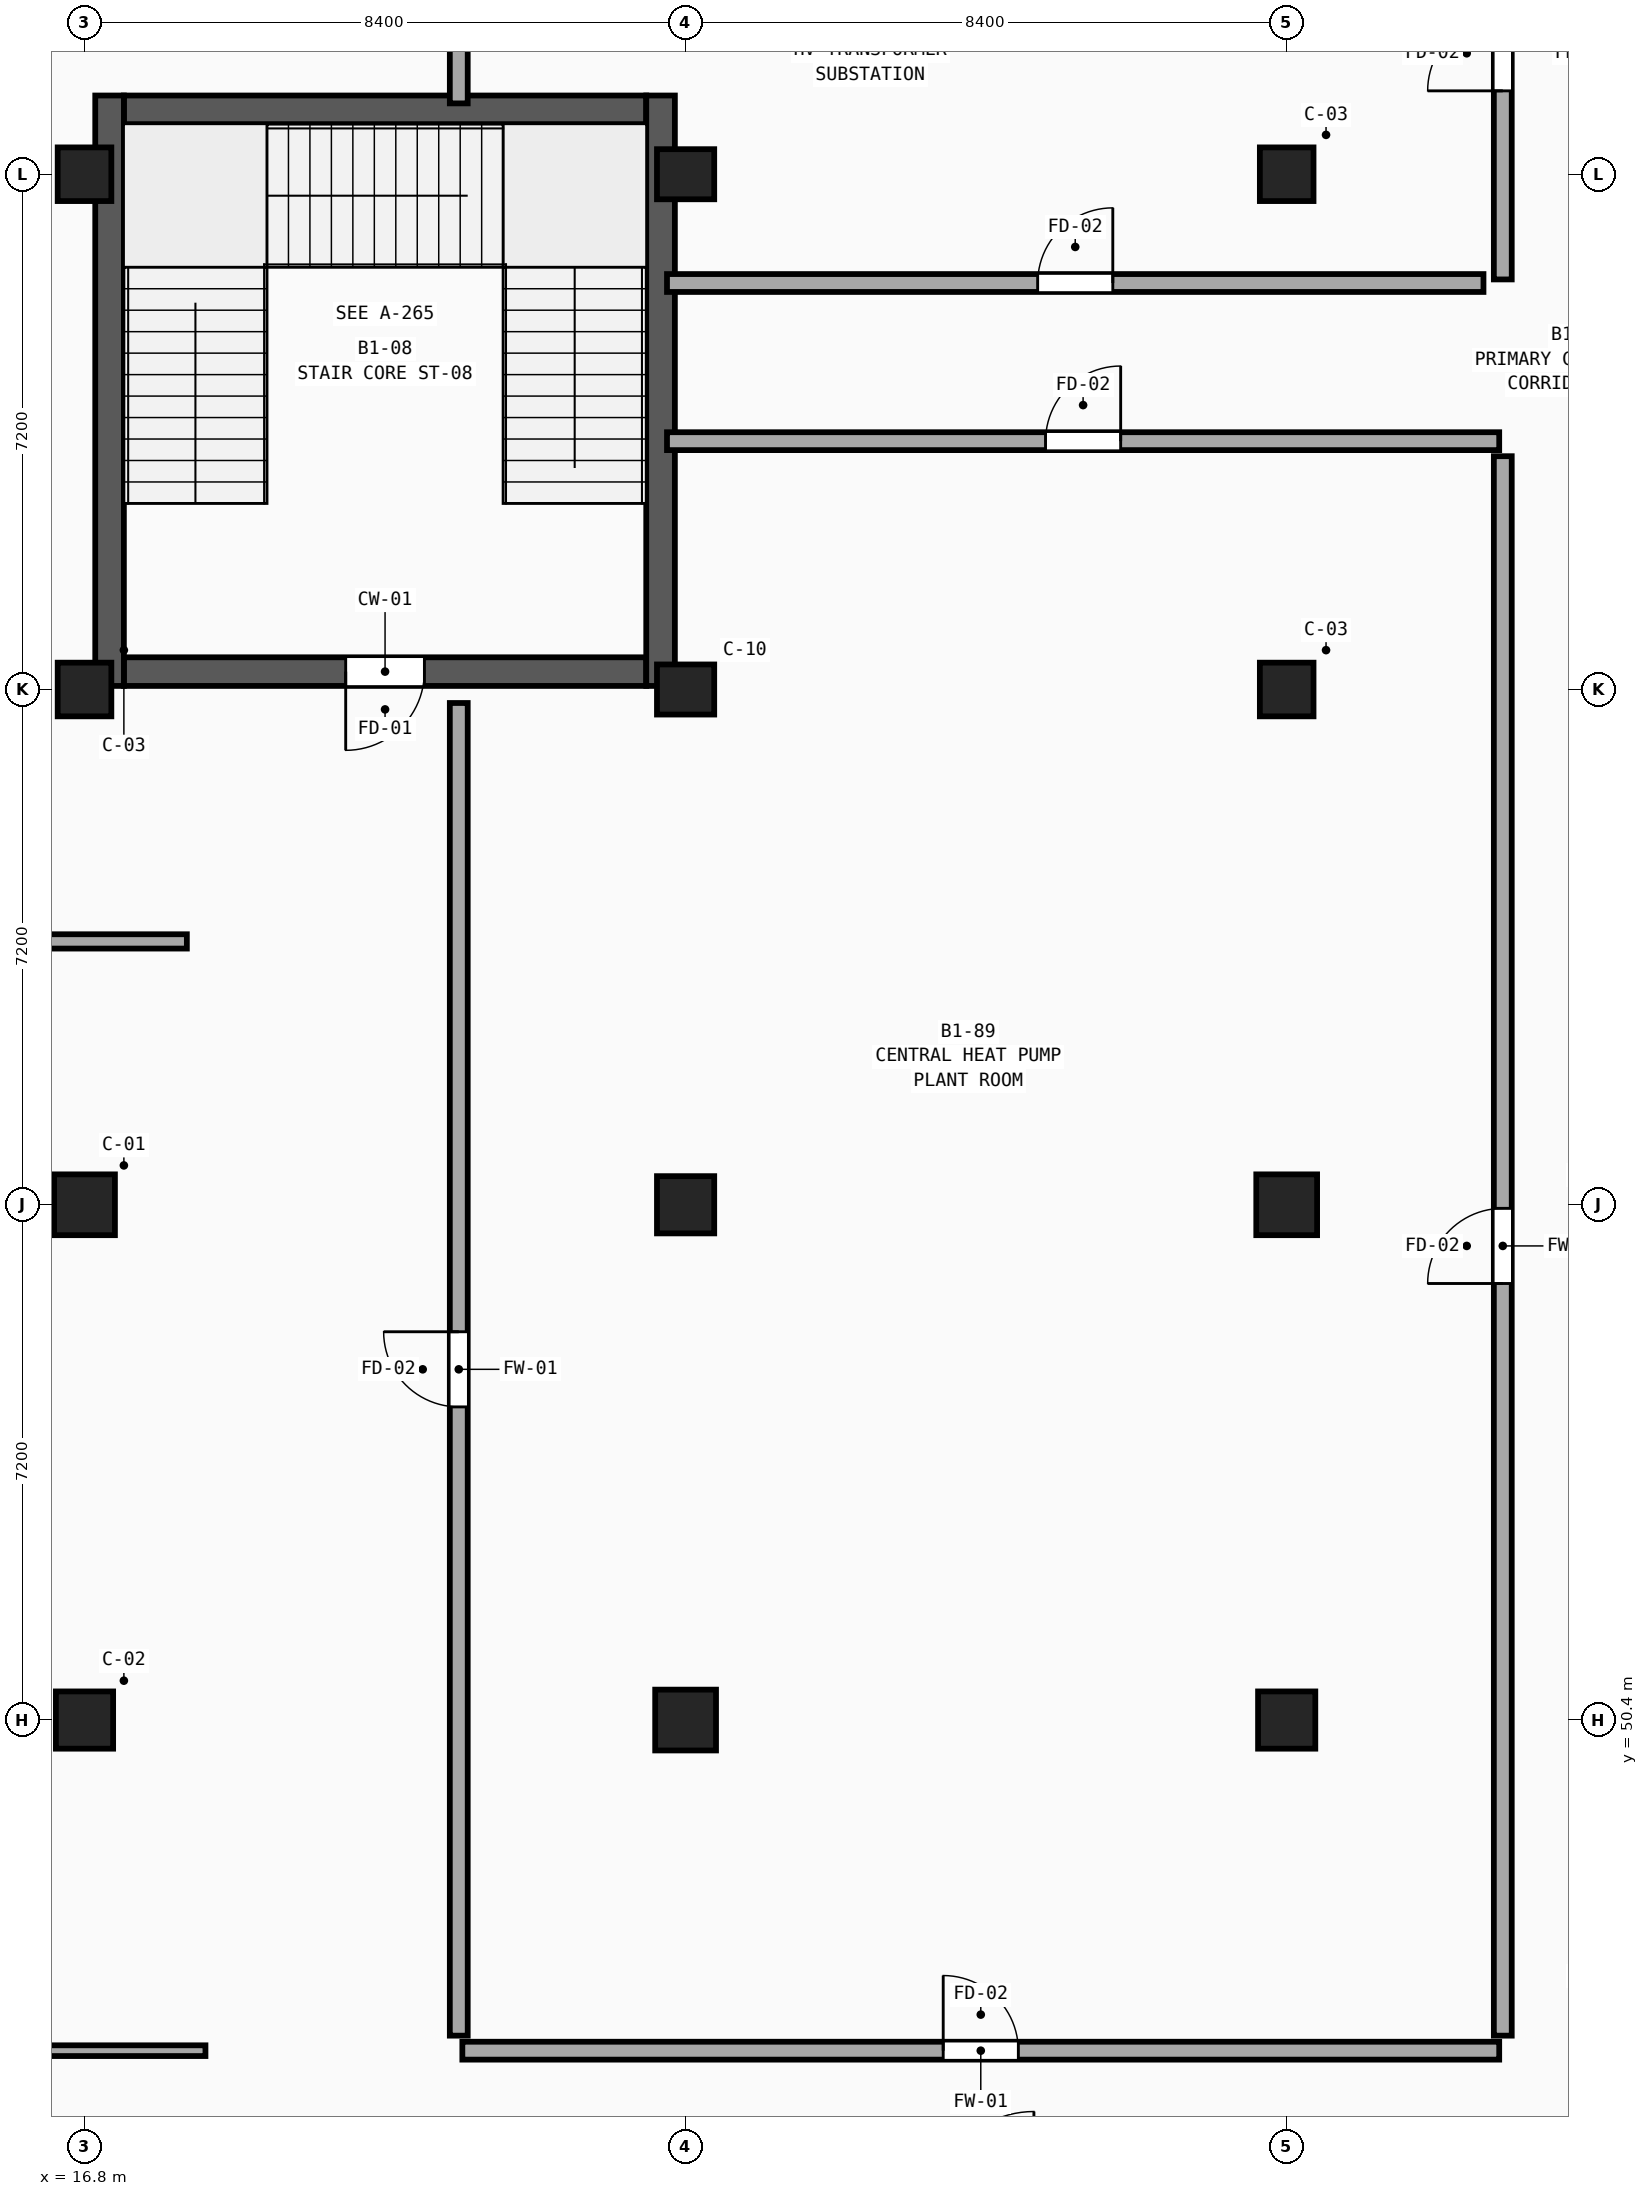
"""IFC4 building model, lengths in metres.
Left out: names, types, materials, properties, quantities, classifications, styles, units other than length and angle.
Written with IfcOpenShell. Run it as: python <this file> out.ifc"""

import sys

from ifc_helpers import new_model, si_unit, direction, frame, frame_2d, origin, origin_2d, place, context, subcontext, project, spatial, rectangle, extrude, element, fill, save


model = new_model("IFC4")
c1 = context("Model", 3, precision=1e-05, world=origin(), true_north=direction((0.0, 1.0)))
c2 = subcontext(c1, "Body", "Model", "MODEL_VIEW")
j1 = project(units=[si_unit("LENGTHUNIT", "METRE"), si_unit("PLANEANGLEUNIT", "RADIAN")], contexts=[c1])
p1 = place(None, origin())
s1 = spatial("IfcSite", under=j1, at=p1, CompositionType="ELEMENT")
p2 = place(p1, origin())
s2 = spatial("IfcBuilding", under=s1, at=p2, CompositionType="ELEMENT")
p3 = place(p2, frame((0.0, 0.0, -5.4)))
s3 = spatial("IfcBuildingStorey", under=s2, at=p3, CompositionType="ELEMENT", Elevation=-5.4)
p4 = place(p3, frame((16.8, 50.4, 0.0), z_axis=(0.0, 0.0, 1.0), x_axis=(1.0, 0.0, 0.0)))
e1 = element("IfcColumn", 1, at=p4, inside=s3, PredefinedType="COLUMN", context=c2, shape_type="SweptSolid", body=[
    extrude(rectangle(XDim=0.8, YDim=0.8, at=origin_2d()), origin(), (0.0, 0.0, 1.0), 5.4),
])
p5 = place(p3, frame((16.8, 57.6, 0.0), z_axis=(0.0, 0.0, 1.0), x_axis=(1.0, 0.0, 0.0)))
e2 = element("IfcColumn", 2, at=p5, inside=s3, PredefinedType="COLUMN", context=c2, shape_type="SweptSolid", body=[
    extrude(rectangle(XDim=0.85, YDim=0.85, at=origin_2d()), origin(), (0.0, 0.0, 1.0), 5.4),
])
for number, where, z_axis, x_axis in (
    (3, (16.8, 64.8, 0.0), (0.0, 0.0, 1.0), (1.0, 0.0, 0.0)),
    (4, (16.8, 72.0, 0.0), (0.0, 0.0, 1.0), (1.0, 0.0, 0.0)),
):
    element("IfcColumn", number, at=place(p3, frame(where, z_axis=z_axis, x_axis=x_axis)), inside=s3, PredefinedType="COLUMN", context=c2, shape_type="SweptSolid", body=[
        extrude(rectangle(XDim=0.75, YDim=0.75, at=origin_2d()), origin(), (0.0, 0.0, 1.0), 5.4),
    ])
p6 = place(p3, frame((25.2, 50.4, 0.0), z_axis=(0.0, 0.0, 1.0), x_axis=(1.0, 0.0, 0.0)))
e5 = element("IfcColumn", 5, at=p6, inside=s3, PredefinedType="COLUMN", context=c2, shape_type="SweptSolid", body=[
    extrude(rectangle(XDim=0.85, YDim=0.85, at=origin_2d()), origin(), (0.0, 0.0, 1.0), 5.4),
])
p7 = place(p3, frame((25.2, 57.6, 0.0), z_axis=(0.0, 0.0, 1.0), x_axis=(1.0, 0.0, 0.0)))
e6 = element("IfcColumn", 6, at=p7, inside=s3, PredefinedType="COLUMN", context=c2, shape_type="SweptSolid", body=[
    extrude(rectangle(XDim=0.8, YDim=0.8, at=origin_2d()), origin(), (0.0, 0.0, 1.0), 5.4),
])
for number, where, z_axis, x_axis in (
    (7, (25.2, 64.8, 0.0), (0.0, 0.0, 1.0), (1.0, 0.0, 0.0)),
    (8, (25.2, 72.0, 0.0), (0.0, 0.0, 1.0), (1.0, 0.0, 0.0)),
):
    element("IfcColumn", number, at=place(p3, frame(where, z_axis=z_axis, x_axis=x_axis)), inside=s3, PredefinedType="COLUMN", context=c2, shape_type="SweptSolid", body=[
        extrude(rectangle(XDim=0.8, YDim=0.7, at=origin_2d()), origin(), (0.0, 0.0, 1.0), 5.4),
    ])
p8 = place(p3, frame((33.6, 50.4, 0.0), z_axis=(0.0, 0.0, 1.0), x_axis=(1.0, 0.0, 0.0)))
e9 = element("IfcColumn", 9, at=p8, inside=s3, PredefinedType="COLUMN", context=c2, shape_type="SweptSolid", body=[
    extrude(rectangle(XDim=0.8, YDim=0.8, at=origin_2d()), origin(), (0.0, 0.0, 1.0), 5.4),
])
p9 = place(p3, frame((33.6, 57.6, 0.0), z_axis=(0.0, 0.0, 1.0), x_axis=(1.0, 0.0, 0.0)))
e10 = element("IfcColumn", 10, at=p9, inside=s3, PredefinedType="COLUMN", context=c2, shape_type="SweptSolid", body=[
    extrude(rectangle(XDim=0.85, YDim=0.85, at=origin_2d()), origin(), (0.0, 0.0, 1.0), 5.4),
])
for number, where, z_axis, x_axis in (
    (11, (33.6, 64.8, 0.0), (0.0, 0.0, 1.0), (1.0, 0.0, 0.0)),
    (12, (33.6, 72.0, 0.0), (0.0, 0.0, 1.0), (1.0, 0.0, 0.0)),
):
    element("IfcColumn", number, at=place(p3, frame(where, z_axis=z_axis, x_axis=x_axis)), inside=s3, PredefinedType="COLUMN", context=c2, shape_type="SweptSolid", body=[
        extrude(rectangle(XDim=0.75, YDim=0.75, at=origin_2d()), origin(), (0.0, 0.0, 1.0), 5.4),
    ])
p10 = place(p3, frame((24.65, 65.05, 0.0), z_axis=(0.0, 0.0, 1.0), x_axis=(-1.0, 0.0, 0.0)))
e13 = element("IfcWall", 13, at=p10, inside=s3, PredefinedType="SHEAR", context=c2, shape_type="SweptSolid", body=[
    extrude(rectangle(XDim=7.3, YDim=0.4, at=frame_2d((3.65, 0.0))), origin(), (0.0, 0.0, 1.0), 5.4),
])
p11 = place(p10, frame((3.1, 0.0, 0.0)))
e14 = element("IfcOpeningElement", 14, at=p11, cuts=e13, PredefinedType="OPENING", context=c2, shape_type="SweptSolid", body=[
    extrude(rectangle(XDim=1.1, YDim=2.2, at=frame_2d((0.55, 1.1))), frame((0.0, 0.22, 0.0), z_axis=(0.0, -1.0, 0.0), x_axis=(1.0, 0.0, 0.0)), (0.0, 0.0, 1.0), 0.44),
])
p12 = place(p3, frame((17.35, 72.9, 0.0), z_axis=(0.0, 0.0, 1.0), x_axis=(1.0, 0.0, 0.0)))
e15 = element("IfcWall", 15, at=p12, inside=s3, PredefinedType="SHEAR", context=c2, shape_type="SweptSolid", body=[
    extrude(rectangle(XDim=7.3, YDim=0.4, at=frame_2d((3.65, 0.0))), origin(), (0.0, 0.0, 1.0), 5.4),
])
for number, where, z_axis, x_axis in (
    (16, (17.15, 73.1, 0.0), (0.0, 0.0, 1.0), (0.0, -1.0, 0.0)),
    (17, (24.85, 64.85, 0.0), (0.0, 0.0, 1.0), (0.0, 1.0, 0.0)),
):
    element("IfcWall", number, at=place(p3, frame(where, z_axis=z_axis, x_axis=x_axis)), inside=s3, PredefinedType="SHEAR", context=c2, shape_type="SweptSolid", body=[
        extrude(rectangle(XDim=8.25, YDim=0.4, at=frame_2d((4.125, 0.0))), origin(), (0.0, 0.0, 1.0), 5.4),
    ])
p13 = place(p3, frame((36.62, 45.99, 0.0), z_axis=(0.0, 0.0, 1.0), x_axis=(0.0, 1.0, 0.0)))
e18 = element("IfcWall", 18, at=p13, inside=s3, PredefinedType="SOLIDWALL", context=c2, shape_type="SweptSolid", body=[
    extrude(rectangle(XDim=22.07, YDim=0.25, at=frame_2d((11.035, 0.0))), origin(), (0.0, 0.0, 1.0), 5.05),
])
p14 = place(p13, frame((10.51, 0.0, 0.0)))
e19 = element("IfcOpeningElement", 19, at=p14, cuts=e18, PredefinedType="OPENING", context=c2, shape_type="SweptSolid", body=[
    extrude(rectangle(XDim=1.05, YDim=2.15, at=frame_2d((0.525, 1.075))), frame((0.0, 0.145, 0.0), z_axis=(0.0, -1.0, 0.0), x_axis=(1.0, 0.0, 0.0)), (0.0, 0.0, 1.0), 0.29),
])
p15 = place(p3, frame((22.03, 45.99, 0.0), z_axis=(0.0, 0.0, 1.0), x_axis=(0.0, 1.0, 0.0)))
e20 = element("IfcWall", 20, at=p15, inside=s3, PredefinedType="SOLIDWALL", context=c2, shape_type="SweptSolid", body=[
    extrude(rectangle(XDim=18.621, YDim=0.25, at=frame_2d((9.311, 0.0))), origin(), (0.0, 0.0, 1.0), 5.05),
])
p16 = place(p15, frame((8.786, 0.0, 0.0)))
e21 = element("IfcOpeningElement", 21, at=p16, cuts=e20, PredefinedType="OPENING", context=c2, shape_type="SweptSolid", body=[
    extrude(rectangle(XDim=1.05, YDim=2.15, at=frame_2d((0.525, 1.075))), frame((0.0, 0.145, 0.0), z_axis=(0.0, -1.0, 0.0), x_axis=(1.0, 0.0, 0.0)), (0.0, 0.0, 1.0), 0.29),
])
p17 = place(p3, frame((22.08, 45.78, 0.0), z_axis=(0.0, 0.0, 1.0), x_axis=(1.0, 0.0, 0.0)))
e22 = element("IfcWall", 22, at=p17, inside=s3, PredefinedType="SOLIDWALL", context=c2, shape_type="SweptSolid", body=[
    extrude(rectangle(XDim=14.49, YDim=0.25, at=frame_2d((7.245, 0.0))), origin(), (0.0, 0.0, 1.0), 5.05),
])
p18 = place(p17, frame((6.72, 0.0, 0.0)))
e23 = element("IfcOpeningElement", 23, at=p18, cuts=e22, PredefinedType="OPENING", context=c2, shape_type="SweptSolid", body=[
    extrude(rectangle(XDim=1.05, YDim=2.15, at=frame_2d((0.525, 1.075))), frame((0.0, 0.145, 0.0), z_axis=(0.0, -1.0, 0.0), x_axis=(1.0, 0.0, 0.0)), (0.0, 0.0, 1.0), 0.29),
])
p19 = place(p3, frame((5.28, 45.78, 0.0), z_axis=(0.0, 0.0, 1.0), x_axis=(1.0, 0.0, 0.0)))
e24 = element("IfcWall", 24, at=p19, inside=s3, PredefinedType="PARTITIONING", context=c2, shape_type="SweptSolid", body=[
    extrude(rectangle(XDim=13.21, YDim=0.15, at=frame_2d((6.605, 0.0))), origin(), (0.0, 0.0, 1.0), 5.05),
])
p20 = place(p19, frame((5.925, 0.0, 0.0)))
e25 = element("IfcOpeningElement", 25, at=p20, cuts=e24, PredefinedType="OPENING", context=c2, shape_type="SweptSolid", body=[
    extrude(rectangle(XDim=1.36, YDim=2.45, at=frame_2d((0.68, 1.225))), frame((0.0, 0.095, 0.0), z_axis=(0.0, -1.0, 0.0), x_axis=(1.0, 0.0, 0.0)), (0.0, 0.0, 1.0), 0.19),
])
p21 = place(p3, frame((24.94, 68.27, 0.0), z_axis=(0.0, 0.0, 1.0), x_axis=(1.0, 0.0, 0.0)))
e26 = element("IfcWall", 26, at=p21, inside=s3, PredefinedType="SOLIDWALL", context=c2, shape_type="SweptSolid", body=[
    extrude(rectangle(XDim=11.63, YDim=0.25, at=frame_2d((5.815, 0.0))), origin(), (0.0, 0.0, 1.0), 5.05),
])
p22 = place(p21, frame((5.29, 0.0, 0.0)))
e27 = element("IfcOpeningElement", 27, at=p22, cuts=e26, PredefinedType="OPENING", context=c2, shape_type="SweptSolid", body=[
    extrude(rectangle(XDim=1.05, YDim=2.15, at=frame_2d((0.525, 1.075))), frame((0.0, 0.145, 0.0), z_axis=(0.0, -1.0, 0.0), x_axis=(1.0, 0.0, 0.0)), (0.0, 0.0, 1.0), 0.29),
])
p23 = place(p3, frame((24.94, 70.48, 0.0), z_axis=(0.0, 0.0, 1.0), x_axis=(1.0, 0.0, 0.0)))
e28 = element("IfcWall", 28, at=p23, inside=s3, PredefinedType="SOLIDWALL", context=c2, shape_type="SweptSolid", body=[
    extrude(rectangle(XDim=11.41, YDim=0.25, at=frame_2d((5.705, 0.0))), origin(), (0.0, 0.0, 1.0), 5.05),
])
p24 = place(p23, frame((5.18, 0.0, 0.0)))
e29 = element("IfcOpeningElement", 29, at=p24, cuts=e28, PredefinedType="OPENING", context=c2, shape_type="SweptSolid", body=[
    extrude(rectangle(XDim=1.05, YDim=2.15, at=frame_2d((0.525, 1.075))), frame((0.0, 0.145, 0.0), z_axis=(0.0, -1.0, 0.0), x_axis=(1.0, 0.0, 0.0)), (0.0, 0.0, 1.0), 0.29),
])
p25 = place(p3, frame((36.62, 70.53, 0.0), z_axis=(0.0, 0.0, 1.0), x_axis=(0.0, 1.0, 0.0)))
e30 = element("IfcWall", 30, at=p25, inside=s3, PredefinedType="SOLIDWALL", context=c2, shape_type="SweptSolid", body=[
    extrude(rectangle(XDim=6.32, YDim=0.25, at=frame_2d((3.16, 0.0))), origin(), (0.0, 0.0, 1.0), 5.05),
])
p26 = place(p25, frame((2.635, 0.0, 0.0)))
e31 = element("IfcOpeningElement", 31, at=p26, cuts=e30, PredefinedType="OPENING", context=c2, shape_type="SweptSolid", body=[
    extrude(rectangle(XDim=1.05, YDim=2.15, at=frame_2d((0.525, 1.075))), frame((0.0, 0.145, 0.0), z_axis=(0.0, -1.0, 0.0), x_axis=(1.0, 0.0, 0.0)), (0.0, 0.0, 1.0), 0.29),
])
p27 = place(p3, frame((22.03, 72.99, 0.0), z_axis=(0.0, 0.0, 1.0), x_axis=(0.0, 1.0, 0.0)))
e32 = element("IfcWall", 32, at=p27, inside=s3, PredefinedType="SOLIDWALL", context=c2, shape_type="SweptSolid", body=[
    extrude(rectangle(XDim=3.86, YDim=0.25, at=frame_2d((1.93, 0.0))), origin(), (0.0, 0.0, 1.0), 5.05),
])
p28 = place(p27, frame((1.405, 0.0, 0.0)))
e33 = element("IfcOpeningElement", 33, at=p28, cuts=e32, PredefinedType="OPENING", context=c2, shape_type="SweptSolid", body=[
    extrude(rectangle(XDim=1.05, YDim=2.15, at=frame_2d((0.525, 1.075))), frame((0.0, 0.145, 0.0), z_axis=(0.0, -1.0, 0.0), x_axis=(1.0, 0.0, 0.0)), (0.0, 0.0, 1.0), 0.29),
])
p29 = place(p3, frame((5.44, 61.28, 0.0), z_axis=(0.0, 0.0, 1.0), x_axis=(1.0, 0.0, 0.0)))
e34 = element("IfcWall", 34, at=p29, inside=s3, PredefinedType="PLUMBINGWALL", context=c2, shape_type="SweptSolid", body=[
    extrude(rectangle(XDim=12.79, YDim=0.2, at=frame_2d((6.395, 0.0))), origin(), (0.0, 0.0, 1.0), 5.05),
])
p30 = place(p11, origin())
e35 = element("IfcDoor", 35, at=p30, inside=s3, OperationType="SINGLE_SWING_RIGHT", PredefinedType="DOOR", context=c2, shape_type="SweptSolid", body=[
    extrude(rectangle(XDim=1.1, YDim=2.2, at=frame_2d((0.55, 1.1))), frame((0.0, 0.025, 0.0), z_axis=(0.0, -1.0, 0.0), x_axis=(1.0, 0.0, 0.0)), (0.0, 0.0, 1.0), 0.05),
])
fill(e14, e35)
p31 = place(p14, origin())
e36 = element("IfcDoor", 36, at=p31, inside=s3, OperationType="SINGLE_SWING_LEFT", PredefinedType="DOOR", context=c2, shape_type="SweptSolid", body=[
    extrude(rectangle(XDim=1.05, YDim=2.15, at=frame_2d((0.525, 1.075))), frame((0.0, 0.025, 0.0), z_axis=(0.0, -1.0, 0.0), x_axis=(1.0, 0.0, 0.0)), (0.0, 0.0, 1.0), 0.05),
])
fill(e19, e36)
p32 = place(p16, origin())
e37 = element("IfcDoor", 37, at=p32, inside=s3, OperationType="SINGLE_SWING_RIGHT", PredefinedType="DOOR", context=c2, shape_type="SweptSolid", body=[
    extrude(rectangle(XDim=1.05, YDim=2.15, at=frame_2d((0.525, 1.075))), frame((0.0, 0.025, 0.0), z_axis=(0.0, -1.0, 0.0), x_axis=(1.0, 0.0, 0.0)), (0.0, 0.0, 1.0), 0.05),
])
fill(e21, e37)
p33 = place(p18, origin())
e38 = element("IfcDoor", 38, at=p33, inside=s3, OperationType="SINGLE_SWING_LEFT", PredefinedType="DOOR", context=c2, shape_type="SweptSolid", body=[
    extrude(rectangle(XDim=1.05, YDim=2.15, at=frame_2d((0.525, 1.075))), frame((0.0, 0.025, 0.0), z_axis=(0.0, -1.0, 0.0), x_axis=(1.0, 0.0, 0.0)), (0.0, 0.0, 1.0), 0.05),
])
fill(e23, e38)
p34 = place(p22, origin())
e39 = element("IfcDoor", 39, at=p34, inside=s3, OperationType="SINGLE_SWING_RIGHT", PredefinedType="DOOR", context=c2, shape_type="SweptSolid", body=[
    extrude(rectangle(XDim=1.05, YDim=2.15, at=frame_2d((0.525, 1.075))), frame((0.0, 0.025, 0.0), z_axis=(0.0, -1.0, 0.0), x_axis=(1.0, 0.0, 0.0)), (0.0, 0.0, 1.0), 0.05),
])
fill(e27, e39)
p35 = place(p24, origin())
e40 = element("IfcDoor", 40, at=p35, inside=s3, OperationType="SINGLE_SWING_RIGHT", PredefinedType="DOOR", context=c2, shape_type="SweptSolid", body=[
    extrude(rectangle(XDim=1.05, YDim=2.15, at=frame_2d((0.525, 1.075))), frame((0.0, 0.025, 0.0), z_axis=(0.0, -1.0, 0.0), x_axis=(1.0, 0.0, 0.0)), (0.0, 0.0, 1.0), 0.05),
])
fill(e29, e40)
p36 = place(p26, origin())
e41 = element("IfcDoor", 41, at=p36, inside=s3, OperationType="SINGLE_SWING_LEFT", PredefinedType="DOOR", context=c2, shape_type="SweptSolid", body=[
    extrude(rectangle(XDim=1.05, YDim=2.15, at=frame_2d((0.525, 1.075))), frame((0.0, 0.025, 0.0), z_axis=(0.0, -1.0, 0.0), x_axis=(1.0, 0.0, 0.0)), (0.0, 0.0, 1.0), 0.05),
])
fill(e31, e41)
save(model, sys.argv[1])
